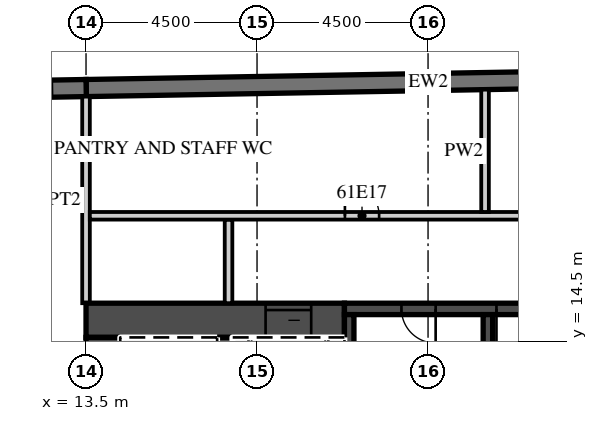
"""IFC4 building model, lengths in metres.
Left out: names, types, materials, properties, quantities, classifications, styles, units other than length and angle.
Written with IfcOpenShell. Run it as: python <this file> out.ifc"""

import sys

from ifc_helpers import new_model, si_unit, direction, frame, frame_2d, origin, place, context, subcontext, project, spatial, rectangle, extrude, element, fill, save


model = new_model("IFC4")
c1 = context("Model", 3, precision=1e-05, world=origin(), true_north=direction((0.0, 1.0)))
c2 = subcontext(c1, "Body", "Model", "MODEL_VIEW")
j1 = project(units=[si_unit("LENGTHUNIT", "METRE"), si_unit("PLANEANGLEUNIT", "RADIAN")], contexts=[c1])
p1 = place(None, origin())
s1 = spatial("IfcSite", under=j1, at=p1, CompositionType="ELEMENT")
p2 = place(p1, origin())
s2 = spatial("IfcBuilding", under=s1, at=p2, CompositionType="ELEMENT")
p3 = place(p2, frame((0.0, 0.0, 247.4)))
s3 = spatial("IfcBuildingStorey", under=s2, at=p3, CompositionType="ELEMENT", Elevation=247.4)
p4 = place(p3, frame((31.504, 21.476, 0.0), z_axis=(0.0, 0.0, 1.0), x_axis=(-0.999847677887, -0.017453395744, 0.0)))
e1 = element("IfcWall", 1, at=p4, inside=s3, PredefinedType="SOLIDWALL", context=c2, shape_type="SweptSolid", body=[
    extrude(rectangle(XDim=18.003, YDim=0.45, at=frame_2d((9.001, 0.0))), origin(), (0.0, 0.0, 1.0), 3.02),
])
p5 = place(p3, frame((13.504, 21.161, 0.0), z_axis=(0.0, 0.0, 1.0), x_axis=(-0.999847763257, -0.017448504532, 0.0)))
e2 = element("IfcWall", 2, at=p5, inside=s3, PredefinedType="SOLIDWALL", context=c2, shape_type="SweptSolid", body=[
    extrude(rectangle(XDim=46.859, YDim=0.45, at=frame_2d((23.43, 0.0))), origin(), (0.0, 0.0, 1.0), 3.02),
])
p6 = place(p5, frame((0.9, 0.0, 0.45)))
e3 = element("IfcOpeningElement", 3, at=p6, cuts=e2, PredefinedType="OPENING", context=c2, shape_type="SweptSolid", body=[
    extrude(rectangle(XDim=2.7, YDim=2.25, at=frame_2d((1.35, 1.125))), frame((0.0, 0.235, 0.0), z_axis=(0.0, -1.0, 0.0), x_axis=(1.0, 0.0, 0.0)), (0.0, 0.0, 1.0), 0.47),
])
p7 = place(p5, frame((5.401, 0.0, 0.45)))
e4 = element("IfcOpeningElement", 4, at=p7, cuts=e2, PredefinedType="OPENING", context=c2, shape_type="SweptSolid", body=[
    extrude(rectangle(XDim=2.7, YDim=2.25, at=frame_2d((1.35, 1.125))), frame((0.0, 0.235, 0.0), z_axis=(0.0, -1.0, 0.0), x_axis=(1.0, 0.0, 0.0)), (0.0, 0.0, 1.0), 0.47),
])
p8 = place(p5, frame((9.902, 0.0, 0.45)))
e5 = element("IfcOpeningElement", 5, at=p8, cuts=e2, PredefinedType="OPENING", context=c2, shape_type="SweptSolid", body=[
    extrude(rectangle(XDim=2.7, YDim=2.25, at=frame_2d((1.35, 1.125))), frame((0.0, 0.235, 0.0), z_axis=(0.0, -1.0, 0.0), x_axis=(1.0, 0.0, 0.0)), (0.0, 0.0, 1.0), 0.47),
])
p9 = place(p5, frame((14.402, 0.0, 0.45)))
e6 = element("IfcOpeningElement", 6, at=p9, cuts=e2, PredefinedType="OPENING", context=c2, shape_type="SweptSolid", body=[
    extrude(rectangle(XDim=2.7, YDim=2.25, at=frame_2d((1.35, 1.125))), frame((0.0, 0.235, 0.0), z_axis=(0.0, -1.0, 0.0), x_axis=(1.0, 0.0, 0.0)), (0.0, 0.0, 1.0), 0.47),
])
p10 = place(p5, frame((18.903, 0.0, 0.45)))
e7 = element("IfcOpeningElement", 7, at=p10, cuts=e2, PredefinedType="OPENING", context=c2, shape_type="SweptSolid", body=[
    extrude(rectangle(XDim=2.7, YDim=2.25, at=frame_2d((1.35, 1.125))), frame((0.0, 0.235, 0.0), z_axis=(0.0, -1.0, 0.0), x_axis=(1.0, 0.0, 0.0)), (0.0, 0.0, 1.0), 0.47),
])
p11 = place(p5, frame((23.404, 0.0, 0.45)))
e8 = element("IfcOpeningElement", 8, at=p11, cuts=e2, PredefinedType="OPENING", context=c2, shape_type="SweptSolid", body=[
    extrude(rectangle(XDim=2.7, YDim=2.25, at=frame_2d((1.35, 1.125))), frame((0.0, 0.235, 0.0), z_axis=(0.0, -1.0, 0.0), x_axis=(1.0, 0.0, 0.0)), (0.0, 0.0, 1.0), 0.47),
])
p12 = place(p5, frame((27.904, 0.0, 0.45)))
e9 = element("IfcOpeningElement", 9, at=p12, cuts=e2, PredefinedType="OPENING", context=c2, shape_type="SweptSolid", body=[
    extrude(rectangle(XDim=2.7, YDim=2.25, at=frame_2d((1.35, 1.125))), frame((0.0, 0.235, 0.0), z_axis=(0.0, -1.0, 0.0), x_axis=(1.0, 0.0, 0.0)), (0.0, 0.0, 1.0), 0.47),
])
p13 = place(p5, frame((32.405, 0.0, 0.45)))
e10 = element("IfcOpeningElement", 10, at=p13, cuts=e2, PredefinedType="OPENING", context=c2, shape_type="SweptSolid", body=[
    extrude(rectangle(XDim=2.7, YDim=2.25, at=frame_2d((1.35, 1.125))), frame((0.0, 0.235, 0.0), z_axis=(0.0, -1.0, 0.0), x_axis=(1.0, 0.0, 0.0)), (0.0, 0.0, 1.0), 0.47),
])
p14 = place(p5, frame((36.906, 0.0, 0.45)))
e11 = element("IfcOpeningElement", 11, at=p14, cuts=e2, PredefinedType="OPENING", context=c2, shape_type="SweptSolid", body=[
    extrude(rectangle(XDim=2.7, YDim=2.25, at=frame_2d((1.35, 1.125))), frame((0.0, 0.235, 0.0), z_axis=(0.0, -1.0, 0.0), x_axis=(1.0, 0.0, 0.0)), (0.0, 0.0, 1.0), 0.47),
])
p15 = place(p5, frame((41.406, 0.0, 0.45)))
e12 = element("IfcOpeningElement", 12, at=p15, cuts=e2, PredefinedType="OPENING", context=c2, shape_type="SweptSolid", body=[
    extrude(rectangle(XDim=2.7, YDim=2.25, at=frame_2d((1.35, 1.125))), frame((0.0, 0.235, 0.0), z_axis=(0.0, -1.0, 0.0), x_axis=(1.0, 0.0, 0.0)), (0.0, 0.0, 1.0), 0.47),
])
p16 = place(p3, frame((13.5, 15.5, 0.0), z_axis=(0.0, 0.0, 1.0), x_axis=(0.0, 1.0, 0.0)))
e13 = element("IfcWall", 13, at=p16, inside=s3, PredefinedType="PARTITIONING", context=c2, shape_type="SweptSolid", body=[
    extrude(rectangle(XDim=5.436, YDim=0.2, at=frame_2d((2.718, 0.0))), origin(), (0.0, 0.0, 1.0), 3.02),
])
p17 = place(p3, frame((13.5, 15.05, 0.0), z_axis=(0.0, 0.0, 1.0), x_axis=(1.0, 0.0, 0.0)))
e14 = element("IfcWall", 14, at=p17, inside=s3, PredefinedType="SHEAR", context=c2, shape_type="SweptSolid", body=[
    extrude(rectangle(XDim=6.8, YDim=0.9, at=frame_2d((3.4, 0.0))), origin(), (0.0, 0.0, 1.0), 3.02),
])
p18 = place(p17, frame((4.725, 0.0, 0.0)))
e15 = element("IfcOpeningElement", 15, at=p18, cuts=e14, PredefinedType="OPENING", context=c2, shape_type="SweptSolid", body=[
    extrude(rectangle(XDim=1.2, YDim=2.1, at=frame_2d((0.6, 1.05))), frame((0.0, 0.46, 0.0), z_axis=(0.0, -1.0, 0.0), x_axis=(1.0, 0.0, 0.0)), (0.0, 0.0, 1.0), 0.92),
])
p19 = place(p3, frame((20.3, 15.35, 0.0), z_axis=(0.0, 0.0, 1.0), x_axis=(1.0, 0.0, 0.0)))
e16 = element("IfcWall", 16, at=p19, inside=s3, PredefinedType="SHEAR", context=c2, shape_type="SweptSolid", body=[
    extrude(rectangle(XDim=10.3, YDim=0.3, at=frame_2d((5.15, 0.0))), origin(), (0.0, 0.0, 1.0), 3.02),
])
p20 = place(p19, frame((4.0, 0.0, 0.0)))
e17 = element("IfcOpeningElement", 17, at=p20, cuts=e16, PredefinedType="OPENING", context=c2, shape_type="SweptSolid", body=[
    extrude(rectangle(XDim=1.3, YDim=2.1, at=frame_2d((0.65, 1.05))), frame((0.0, 0.16, 0.0), z_axis=(0.0, -1.0, 0.0), x_axis=(1.0, 0.0, 0.0)), (0.0, 0.0, 1.0), 0.32),
])
p21 = place(p19, frame((1.5, 0.0, 0.0)))
e18 = element("IfcOpeningElement", 18, at=p21, cuts=e16, PredefinedType="OPENING", context=c2, shape_type="SweptSolid", body=[
    extrude(rectangle(XDim=0.9, YDim=2.1, at=frame_2d((0.45, 1.05))), frame((0.0, 0.16, 0.0), z_axis=(0.0, -1.0, 0.0), x_axis=(1.0, 0.0, 0.0)), (0.0, 0.0, 1.0), 0.32),
])
p22 = place(p3, frame((13.95, 2.4, 0.0), z_axis=(0.0, 0.0, 1.0), x_axis=(0.0, 1.0, 0.0)))
e19 = element("IfcWall", 19, at=p22, inside=s3, PredefinedType="SHEAR", context=c2, shape_type="SweptSolid", body=[
    extrude(rectangle(XDim=12.2, YDim=0.9, at=frame_2d((6.1, 0.0))), origin(), (0.0, 0.0, 1.0), 3.02),
])
p23 = place(p3, frame((17.15, 8.8, 0.0), z_axis=(0.0, 0.0, 1.0), x_axis=(0.0, 1.0, 0.0)))
e20 = element("IfcWall", 20, at=p23, inside=s3, PredefinedType="SHEAR", context=c2, shape_type="SweptSolid", body=[
    extrude(rectangle(XDim=5.8, YDim=0.4, at=frame_2d((2.9, 0.0))), origin(), (0.0, 0.0, 1.0), 3.02),
])
for number, where, z_axis, x_axis in (
    (21, (20.425, 11.95, 0.0), (0.0, 0.0, 1.0), (0.0, 1.0, 0.0)),
    (22, (24.075, 11.95, 0.0), (0.0, 0.0, 1.0), (0.0, 1.0, 0.0)),
):
    element("IfcWall", number, at=place(p3, frame(where, z_axis=z_axis, x_axis=x_axis)), inside=s3, PredefinedType="SHEAR", context=c2, shape_type="SweptSolid", body=[
        extrude(rectangle(XDim=3.25, YDim=0.25, at=frame_2d((1.625, 0.0))), origin(), (0.0, 0.0, 1.0), 3.02),
    ])
p24 = place(p3, frame((17.25, 15.5, 0.0), z_axis=(0.0, 0.0, 1.0), x_axis=(0.0, 1.0, 0.0)))
e23 = element("IfcWall", 23, at=p24, inside=s3, PredefinedType="PARTITIONING", context=c2, shape_type="SweptSolid", body=[
    extrude(rectangle(XDim=2.2, YDim=0.2, at=frame_2d((1.1, 0.0))), origin(), (0.0, 0.0, 1.0), 3.02),
])
p25 = place(p3, frame((13.6, 17.8, 0.0), z_axis=(0.0, 0.0, 1.0), x_axis=(1.0, 0.0, 0.0)))
e24 = element("IfcWall", 24, at=p25, inside=s3, PredefinedType="PARTITIONING", context=c2, shape_type="SweptSolid", body=[
    extrude(rectangle(XDim=28.657, YDim=0.2, at=frame_2d((14.329, 0.0))), origin(), (0.0, 0.0, 1.0), 3.02),
])
p26 = place(p25, frame((15.012, 0.0, 0.0)))
e25 = element("IfcOpeningElement", 25, at=p26, cuts=e24, PredefinedType="OPENING", context=c2, shape_type="SweptSolid", body=[
    extrude(rectangle(XDim=0.9, YDim=2.1, at=frame_2d((0.45, 1.05))), frame((0.0, 0.11, 0.0), z_axis=(0.0, -1.0, 0.0), x_axis=(1.0, 0.0, 0.0)), (0.0, 0.0, 1.0), 0.22),
])
p27 = place(p25, frame((6.712, 0.0, 0.0)))
e26 = element("IfcOpeningElement", 26, at=p27, cuts=e24, PredefinedType="OPENING", context=c2, shape_type="SweptSolid", body=[
    extrude(rectangle(XDim=0.9, YDim=2.1, at=frame_2d((0.45, 1.05))), frame((0.0, 0.11, 0.0), z_axis=(0.0, -1.0, 0.0), x_axis=(1.0, 0.0, 0.0)), (0.0, 0.0, 1.0), 0.22),
])
p28 = place(p3, frame((24.0, 17.9, 0.0), z_axis=(0.0, 0.0, 1.0), x_axis=(0.0, 1.0, 0.0)))
e27 = element("IfcWall", 27, at=p28, inside=s3, PredefinedType="PARTITIONING", context=c2, shape_type="SweptSolid", body=[
    extrude(rectangle(XDim=3.22, YDim=0.2, at=frame_2d((1.61, 0.0))), origin(), (0.0, 0.0, 1.0), 3.02),
])
p29 = place(p6, origin())
e28 = element("IfcWindow", 28, at=p29, inside=s3, PartitioningType="SINGLE_PANEL", PredefinedType="WINDOW", context=c2, shape_type="SweptSolid", body=[
    extrude(rectangle(XDim=2.7, YDim=2.25, at=frame_2d((1.35, 1.125))), frame((0.0, 0.09, 0.0), z_axis=(0.0, -1.0, 0.0), x_axis=(1.0, 0.0, 0.0)), (0.0, 0.0, 1.0), 0.06),
])
fill(e3, e28)
p30 = place(p18, origin())
e29 = element("IfcDoor", 29, at=p30, inside=s3, OperationType="SLIDING_TO_LEFT", PredefinedType="DOOR", context=c2, shape_type="SweptSolid", body=[
    extrude(rectangle(XDim=1.2, YDim=2.1, at=frame_2d((0.6, 1.05))), frame((0.0, 0.025, 0.0), z_axis=(0.0, -1.0, 0.0), x_axis=(1.0, 0.0, 0.0)), (0.0, 0.0, 1.0), 0.05),
])
fill(e15, e29)
p31 = place(p20, origin())
e30 = element("IfcDoor", 30, at=p31, inside=s3, OperationType="SINGLE_SWING_LEFT", PredefinedType="DOOR", context=c2, shape_type="SweptSolid", body=[
    extrude(rectangle(XDim=1.3, YDim=2.1, at=frame_2d((0.65, 1.05))), frame((0.0, 0.025, 0.0), z_axis=(0.0, -1.0, 0.0), x_axis=(1.0, 0.0, 0.0)), (0.0, 0.0, 1.0), 0.05),
])
fill(e17, e30)
p32 = place(p21, origin())
e31 = element("IfcDoor", 31, at=p32, inside=s3, OperationType="SINGLE_SWING_RIGHT", PredefinedType="DOOR", context=c2, shape_type="SweptSolid", body=[
    extrude(rectangle(XDim=0.9, YDim=2.1, at=frame_2d((0.45, 1.05))), frame((0.0, 0.025, 0.0), z_axis=(0.0, -1.0, 0.0), x_axis=(1.0, 0.0, 0.0)), (0.0, 0.0, 1.0), 0.05),
])
fill(e18, e31)
p33 = place(p27, origin())
e32 = element("IfcDoor", 32, at=p33, inside=s3, OperationType="SINGLE_SWING_LEFT", PredefinedType="DOOR", context=c2, shape_type="SweptSolid", body=[
    extrude(rectangle(XDim=0.9, YDim=2.1, at=frame_2d((0.45, 1.05))), frame((0.0, 0.025, 0.0), z_axis=(0.0, -1.0, 0.0), x_axis=(1.0, 0.0, 0.0)), (0.0, 0.0, 1.0), 0.05),
])
fill(e26, e32)
save(model, sys.argv[1])
